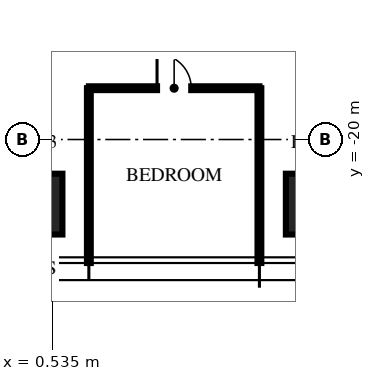
"""IFC4 building model, lengths in metres.
Left out: names, types, materials, properties, quantities, classifications, styles, units other than length and angle.
Written with IfcOpenShell. Run it as: python <this file> out.ifc"""

import sys

from ifc_helpers import new_model, si_unit, direction, frame, frame_2d, origin, origin_2d, place, context, subcontext, project, spatial, rectangle, extrude, element, fill, save


model = new_model("IFC4")
c1 = context("Model", 3, precision=1e-05, world=origin(), true_north=direction((0.0, 1.0)))
c2 = subcontext(c1, "Body", "Model", "MODEL_VIEW")
j1 = project(units=[si_unit("LENGTHUNIT", "METRE"), si_unit("PLANEANGLEUNIT", "RADIAN")], contexts=[c1])
p1 = place(None, origin())
s1 = spatial("IfcSite", under=j1, at=p1, CompositionType="ELEMENT")
p2 = place(p1, origin())
s2 = spatial("IfcBuilding", under=s1, at=p2, CompositionType="ELEMENT")
p3 = place(p2, frame((0.0, 0.0, 319.5)))
s3 = spatial("IfcBuildingStorey", under=s2, at=p3, CompositionType="ELEMENT", Elevation=319.5)
for number, where, z_axis, x_axis in (
    (1, (7.48, -21.7, 0.0), (0.0, 0.0, 1.0), (1.0, 0.0, 0.0)),
    (2, (0.0, -21.7, 0.0), (0.0, 0.0, 1.0), (1.0, 0.0, 0.0)),
):
    element("IfcColumn", number, at=place(p3, frame(where, z_axis=z_axis, x_axis=x_axis)), inside=s3, PredefinedType="COLUMN", context=c2, shape_type="SweptSolid", body=[
        extrude(rectangle(XDim=1.6, YDim=1.6, at=origin_2d()), origin(), (0.0, 0.0, 1.0), 3.75),
    ])
for number, where, z_axis, x_axis in (
    (3, (1.496, -18.65, 0.0), (0.0, 0.0, 1.0), (0.0, -1.0, 0.0)),
    (4, (5.984, -18.65, 0.0), (0.0, 0.0, 1.0), (0.0, -1.0, 0.0)),
):
    element("IfcWall", number, at=place(p3, frame(where, z_axis=z_axis, x_axis=x_axis)), inside=s3, PredefinedType="PARTITIONING", context=c2, shape_type="SweptSolid", body=[
        extrude(rectangle(XDim=4.6, YDim=0.1, at=frame_2d((2.3, 0.0))), origin(), (0.0, 0.0, 1.0), 3.01),
    ])
p4 = place(p3, frame((1.496, -18.65, 0.0), z_axis=(0.0, 0.0, 1.0), x_axis=(1.0, 0.0, 0.0)))
e5 = element("IfcWall", 5, at=p4, inside=s3, PredefinedType="PARTITIONING", context=c2, shape_type="SweptSolid", body=[
    extrude(rectangle(XDim=4.488, YDim=0.1, at=frame_2d((2.244, 0.0))), origin(), (0.0, 0.0, 1.0), 2.91),
])
p5 = place(p4, frame((1.794, 0.0, 0.0)))
e6 = element("IfcOpeningElement", 6, at=p5, cuts=e5, PredefinedType="OPENING", context=c2, shape_type="SweptSolid", body=[
    extrude(rectangle(XDim=0.9, YDim=2.1, at=frame_2d((0.45, 1.05))), frame((0.0, 0.06, 0.0), z_axis=(0.0, -1.0, 0.0), x_axis=(1.0, 0.0, 0.0)), (0.0, 0.0, 1.0), 0.12),
])
p6 = place(p5, origin())
e7 = element("IfcDoor", 7, at=p6, inside=s3, OperationType="SINGLE_SWING_LEFT", PredefinedType="DOOR", context=c2, shape_type="SweptSolid", body=[
    extrude(rectangle(XDim=0.9, YDim=2.1, at=frame_2d((0.45, 1.05))), frame((0.0, 0.025, 0.0), z_axis=(0.0, -1.0, 0.0), x_axis=(1.0, 0.0, 0.0)), (0.0, 0.0, 1.0), 0.05),
])
fill(e6, e7)
save(model, sys.argv[1])
